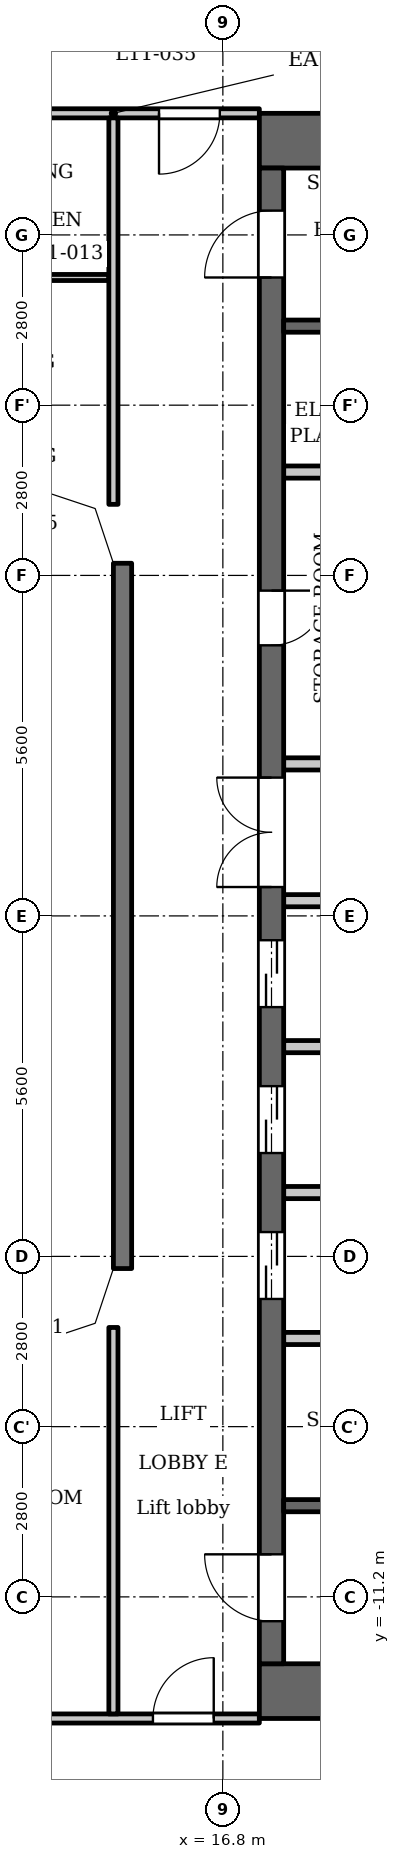
"""IFC4 building model, lengths in metres.
Left out: names, types, materials, properties, quantities, classifications, styles, units other than length and angle.
Written with IfcOpenShell. Run it as: python <this file> out.ifc"""

import sys

from ifc_helpers import new_model, si_unit, direction, frame, frame_2d, origin, place, context, subcontext, project, spatial, polyline, rectangle, outline, extrude, element, fill, save


model = new_model("IFC4")
c1 = context("Model", 3, precision=1e-05, world=origin(), true_north=direction((0.0, 1.0)))
c2 = subcontext(c1, "Body", "Model", "MODEL_VIEW")
j1 = project(units=[si_unit("LENGTHUNIT", "METRE"), si_unit("PLANEANGLEUNIT", "RADIAN")], contexts=[c1])
p1 = place(None, origin())
s1 = spatial("IfcSite", under=j1, at=p1, CompositionType="ELEMENT")
p2 = place(p1, origin())
s2 = spatial("IfcBuilding", under=s1, at=p2, CompositionType="ELEMENT")
p3 = place(p2, frame((0.0, 0.0, 48.0)))
s3 = spatial("IfcBuildingStorey", under=s2, at=p3, CompositionType="ELEMENT", Elevation=48.0)
p4 = place(p3, frame((15.15, 5.8, 0.0), z_axis=(0.0, 0.0, 1.0), x_axis=(0.0, -1.0, 0.0)))
e1 = element("IfcWall", 1, at=p4, inside=s3, PredefinedType="SOLIDWALL", context=c2, shape_type="SweptSolid", body=[
    extrude(rectangle(XDim=11.6, YDim=0.3, at=frame_2d((5.8, 0.0))), origin(), (0.0, 0.0, 1.0), 3.2),
])
for number, where, z_axis, x_axis in (
    (2, (17.4, 12.75, 0.0), (0.0, 0.0, 1.0), (1.0, 0.0, 0.0)),
    (3, (17.4, -12.75, 0.0), (0.0, 0.0, 1.0), (1.0, 0.0, 0.0)),
):
    element("IfcWall", number, at=place(p3, frame(where, z_axis=z_axis, x_axis=x_axis)), inside=s3, PredefinedType="SHEAR", context=c2, shape_type="SweptSolid", body=[
        extrude(rectangle(XDim=10.4, YDim=0.9, at=frame_2d((5.2, 0.0))), origin(), (0.0, 0.0, 1.0), 3.2),
    ])
p5 = place(p3, frame((17.6, -12.3, 0.0), z_axis=(0.0, 0.0, 1.0), x_axis=(0.0, 1.0, 0.0)))
e4 = element("IfcWall", 4, at=p5, inside=s3, PredefinedType="SHEAR", context=c2, shape_type="SweptSolid", body=[
    extrude(rectangle(XDim=24.6, YDim=0.4, at=frame_2d((12.3, 0.0))), origin(), (0.0, 0.0, 1.0), 3.2),
])
p6 = place(p5, frame((6.0, 0.0, 0.0)))
e5 = element("IfcOpeningElement", 5, at=p6, cuts=e4, PredefinedType="OPENING", context=c2, shape_type="SweptSolid", body=[
    extrude(rectangle(XDim=1.1, YDim=2.1, at=frame_2d((0.55, 1.05))), frame((0.0, 0.21, 0.0), z_axis=(0.0, -1.0, 0.0), x_axis=(1.0, 0.0, 0.0)), (0.0, 0.0, 1.0), 0.42),
])
p7 = place(p5, frame((8.4, 0.0, 0.0)))
e6 = element("IfcOpeningElement", 6, at=p7, cuts=e4, PredefinedType="OPENING", context=c2, shape_type="SweptSolid", body=[
    extrude(rectangle(XDim=1.1, YDim=2.1, at=frame_2d((0.55, 1.05))), frame((0.0, 0.21, 0.0), z_axis=(0.0, -1.0, 0.0), x_axis=(1.0, 0.0, 0.0)), (0.0, 0.0, 1.0), 0.42),
])
p8 = place(p5, frame((10.8, 0.0, 0.0)))
e7 = element("IfcOpeningElement", 7, at=p8, cuts=e4, PredefinedType="OPENING", context=c2, shape_type="SweptSolid", body=[
    extrude(rectangle(XDim=1.1, YDim=2.1, at=frame_2d((0.55, 1.05))), frame((0.0, 0.21, 0.0), z_axis=(0.0, -1.0, 0.0), x_axis=(1.0, 0.0, 0.0)), (0.0, 0.0, 1.0), 0.42),
])
p9 = place(p5, frame((16.75, 0.0, 0.0)))
e8 = element("IfcOpeningElement", 8, at=p9, cuts=e4, PredefinedType="OPENING", context=c2, shape_type="SweptSolid", body=[
    extrude(rectangle(XDim=0.9, YDim=2.1, at=frame_2d((0.45, 1.05))), frame((0.0, 0.21, 0.0), z_axis=(0.0, -1.0, 0.0), x_axis=(1.0, 0.0, 0.0)), (0.0, 0.0, 1.0), 0.42),
])
p10 = place(p5, frame((22.8, 0.0, 0.0)))
e9 = element("IfcOpeningElement", 9, at=p10, cuts=e4, PredefinedType="OPENING", context=c2, shape_type="SweptSolid", body=[
    extrude(rectangle(XDim=1.1, YDim=2.1, at=frame_2d((0.55, 1.05))), frame((0.0, 0.21, 0.0), z_axis=(0.0, -1.0, 0.0), x_axis=(1.0, 0.0, 0.0)), (0.0, 0.0, 1.0), 0.42),
])
p11 = place(p5, frame((0.7, 0.0, 0.0)))
e10 = element("IfcOpeningElement", 10, at=p11, cuts=e4, PredefinedType="OPENING", context=c2, shape_type="SweptSolid", body=[
    extrude(rectangle(XDim=1.1, YDim=2.1, at=frame_2d((0.55, 1.05))), frame((0.0, 0.21, 0.0), z_axis=(0.0, -1.0, 0.0), x_axis=(1.0, 0.0, 0.0)), (0.0, 0.0, 1.0), 0.42),
])
p12 = place(p5, frame((12.775, 0.0, 0.0)))
e11 = element("IfcOpeningElement", 11, at=p12, cuts=e4, PredefinedType="OPENING", context=c2, shape_type="SweptSolid", body=[
    extrude(rectangle(XDim=1.8, YDim=2.1, at=frame_2d((0.9, 1.05))), frame((0.0, 0.21, 0.0), z_axis=(0.0, -1.0, 0.0), x_axis=(1.0, 0.0, 0.0)), (0.0, 0.0, 1.0), 0.42),
])
p13 = place(p3, frame((17.8, -9.7, 0.0), z_axis=(0.0, 0.0, 1.0), x_axis=(1.0, 0.0, 0.0)))
e12 = element("IfcWall", 12, at=p13, inside=s3, PredefinedType="SHEAR", context=c2, shape_type="SweptSolid", body=[
    extrude(rectangle(XDim=8.3, YDim=0.2, at=frame_2d((4.15, 0.0))), origin(), (0.0, 0.0, 1.0), 3.2),
])
p14 = place(p13, frame((0.85, 0.0, 0.0)))
e13 = element("IfcOpeningElement", 13, at=p14, cuts=e12, PredefinedType="OPENING", context=c2, shape_type="SweptSolid", body=[
    extrude(rectangle(XDim=1.1, YDim=2.1, at=frame_2d((0.55, 1.05))), frame((0.0, 0.11, 0.0), z_axis=(0.0, -1.0, 0.0), x_axis=(1.0, 0.0, 0.0)), (0.0, 0.0, 1.0), 0.22),
])
p15 = place(p13, frame((3.75, 0.0, 0.0)))
e14 = element("IfcOpeningElement", 14, at=p15, cuts=e12, PredefinedType="OPENING", context=c2, shape_type="SweptSolid", body=[
    extrude(rectangle(XDim=1.1, YDim=2.1, at=frame_2d((0.55, 1.05))), frame((0.0, 0.11, 0.0), z_axis=(0.0, -1.0, 0.0), x_axis=(1.0, 0.0, 0.0)), (0.0, 0.0, 1.0), 0.22),
])
for number, where, z_axis, x_axis in (
    (15, (17.8, -6.95, 0.0), (0.0, 0.0, 1.0), (1.0, 0.0, 0.0)),
    (16, (17.8, -4.55, 0.0), (0.0, 0.0, 1.0), (1.0, 0.0, 0.0)),
    (17, (17.8, -2.15, 0.0), (0.0, 0.0, 1.0), (1.0, 0.0, 0.0)),
):
    element("IfcWall", number, at=place(p3, frame(where, z_axis=z_axis, x_axis=x_axis)), inside=s3, PredefinedType="PARTITIONING", context=c2, shape_type="SweptSolid", body=[
        extrude(rectangle(XDim=2.8, YDim=0.2, at=frame_2d((1.4, 0.0))), origin(), (0.0, 0.0, 1.0), 3.2),
    ])
p16 = place(p3, frame((17.8, 0.25, 0.0), z_axis=(0.0, 0.0, 1.0), x_axis=(1.0, 0.0, 0.0)))
e18 = element("IfcWall", 18, at=p16, inside=s3, PredefinedType="PARTITIONING", context=c2, shape_type="SweptSolid", body=[
    extrude(rectangle(XDim=3.0, YDim=0.2, at=frame_2d((1.5, 0.0))), origin(), (0.0, 0.0, 1.0), 3.2),
])
p17 = place(p3, frame((17.8, 2.5, 0.0), z_axis=(0.0, 0.0, 1.0), x_axis=(1.0, 0.0, 0.0)))
e19 = element("IfcWall", 19, at=p17, inside=s3, PredefinedType="PARTITIONING", context=c2, shape_type="SweptSolid", body=[
    extrude(rectangle(XDim=3.0, YDim=0.2, at=frame_2d((1.5, 0.0))), origin(), (0.0, 0.0, 1.0), 3.2),
])
p18 = place(p17, frame((1.7, 0.0, 0.0)))
e20 = element("IfcOpeningElement", 20, at=p18, cuts=e19, PredefinedType="OPENING", context=c2, shape_type="SweptSolid", body=[
    extrude(rectangle(XDim=0.9, YDim=2.1, at=frame_2d((0.45, 1.05))), frame((0.0, 0.11, 0.0), z_axis=(0.0, -1.0, 0.0), x_axis=(1.0, 0.0, 0.0)), (0.0, 0.0, 1.0), 0.22),
])
p19 = place(p3, frame((17.8, 7.3, 0.0), z_axis=(0.0, 0.0, 1.0), x_axis=(1.0, 0.0, 0.0)))
e21 = element("IfcWall", 21, at=p19, inside=s3, PredefinedType="PARTITIONING", context=c2, shape_type="SweptSolid", body=[
    extrude(rectangle(XDim=2.8, YDim=0.2, at=frame_2d((1.4, 0.0))), origin(), (0.0, 0.0, 1.0), 3.2),
])
p20 = place(p3, frame((17.8, 9.7, 0.0), z_axis=(0.0, 0.0, 1.0), x_axis=(1.0, 0.0, 0.0)))
e22 = element("IfcWall", 22, at=p20, inside=s3, PredefinedType="SHEAR", context=c2, shape_type="SweptSolid", body=[
    extrude(rectangle(XDim=8.3, YDim=0.2, at=frame_2d((4.15, 0.0))), origin(), (0.0, 0.0, 1.0), 3.2),
])
p21 = place(p20, frame((0.85, 0.0, 0.0)))
e23 = element("IfcOpeningElement", 23, at=p21, cuts=e22, PredefinedType="OPENING", context=c2, shape_type="SweptSolid", body=[
    extrude(rectangle(XDim=1.1, YDim=2.1, at=frame_2d((0.55, 1.05))), frame((0.0, 0.11, 0.0), z_axis=(0.0, -1.0, 0.0), x_axis=(1.0, 0.0, 0.0)), (0.0, 0.0, 1.0), 0.22),
])
p22 = place(p20, frame((3.75, 0.0, 0.0)))
e24 = element("IfcOpeningElement", 24, at=p22, cuts=e22, PredefinedType="OPENING", context=c2, shape_type="SweptSolid", body=[
    extrude(rectangle(XDim=1.1, YDim=2.1, at=frame_2d((0.55, 1.05))), frame((0.0, 0.11, 0.0), z_axis=(0.0, -1.0, 0.0), x_axis=(1.0, 0.0, 0.0)), (0.0, 0.0, 1.0), 0.22),
])
p23 = place(p3, frame((-17.4, -13.2, 0.0), z_axis=(0.0, 0.0, 1.0), x_axis=(1.0, 0.0, 0.0)))
e25 = element("IfcWall", 25, at=p23, inside=s3, PredefinedType="PARTITIONING", context=c2, shape_type="SweptSolid", body=[
    extrude(rectangle(XDim=34.8, YDim=0.15, at=frame_2d((17.4, 0.0))), origin(), (0.0, 0.0, 1.0), 3.2),
])
p24 = place(p23, frame((0.65, 0.0, 0.0)))
e26 = element("IfcOpeningElement", 26, at=p24, cuts=e25, PredefinedType="OPENING", context=c2, shape_type="SweptSolid", body=[
    extrude(rectangle(XDim=1.0, YDim=2.1, at=frame_2d((0.5, 1.05))), frame((0.0, 0.085, 0.0), z_axis=(0.0, -1.0, 0.0), x_axis=(1.0, 0.0, 0.0)), (0.0, 0.0, 1.0), 0.17),
])
p25 = place(p23, frame((33.05, 0.0, 0.0)))
e27 = element("IfcOpeningElement", 27, at=p25, cuts=e25, PredefinedType="OPENING", context=c2, shape_type="SweptSolid", body=[
    extrude(rectangle(XDim=1.0, YDim=2.1, at=frame_2d((0.5, 1.05))), frame((0.0, 0.085, 0.0), z_axis=(0.0, -1.0, 0.0), x_axis=(1.0, 0.0, 0.0)), (0.0, 0.0, 1.0), 0.17),
])
p26 = place(p23, frame((4.55, 0.0, 0.0)))
e28 = element("IfcOpeningElement", 28, at=p26, cuts=e25, PredefinedType="OPENING", context=c2, shape_type="SweptSolid", body=[
    extrude(rectangle(XDim=1.0, YDim=2.1, at=frame_2d((0.5, 1.05))), frame((0.0, 0.085, 0.0), z_axis=(0.0, -1.0, 0.0), x_axis=(1.0, 0.0, 0.0)), (0.0, 0.0, 1.0), 0.17),
])
p27 = place(p23, frame((6.9, 0.0, 0.0)))
e29 = element("IfcOpeningElement", 29, at=p27, cuts=e25, PredefinedType="OPENING", context=c2, shape_type="SweptSolid", body=[
    extrude(rectangle(XDim=1.0, YDim=2.1, at=frame_2d((0.5, 1.05))), frame((0.0, 0.085, 0.0), z_axis=(0.0, -1.0, 0.0), x_axis=(1.0, 0.0, 0.0)), (0.0, 0.0, 1.0), 0.17),
])
p28 = place(p23, frame((15.75, 0.0, 0.0)))
e30 = element("IfcOpeningElement", 30, at=p28, cuts=e25, PredefinedType="OPENING", context=c2, shape_type="SweptSolid", body=[
    extrude(rectangle(XDim=1.0, YDim=2.1, at=frame_2d((0.5, 1.05))), frame((0.0, 0.085, 0.0), z_axis=(0.0, -1.0, 0.0), x_axis=(1.0, 0.0, 0.0)), (0.0, 0.0, 1.0), 0.17),
])
p29 = place(p23, frame((18.1, 0.0, 0.0)))
e31 = element("IfcOpeningElement", 31, at=p29, cuts=e25, PredefinedType="OPENING", context=c2, shape_type="SweptSolid", body=[
    extrude(rectangle(XDim=1.0, YDim=2.1, at=frame_2d((0.5, 1.05))), frame((0.0, 0.085, 0.0), z_axis=(0.0, -1.0, 0.0), x_axis=(1.0, 0.0, 0.0)), (0.0, 0.0, 1.0), 0.17),
])
p30 = place(p23, frame((26.95, 0.0, 0.0)))
e32 = element("IfcOpeningElement", 32, at=p30, cuts=e25, PredefinedType="OPENING", context=c2, shape_type="SweptSolid", body=[
    extrude(rectangle(XDim=1.0, YDim=2.1, at=frame_2d((0.5, 1.05))), frame((0.0, 0.085, 0.0), z_axis=(0.0, -1.0, 0.0), x_axis=(1.0, 0.0, 0.0)), (0.0, 0.0, 1.0), 0.17),
])
p31 = place(p23, frame((29.25, 0.0, 0.0)))
e33 = element("IfcOpeningElement", 33, at=p31, cuts=e25, PredefinedType="OPENING", context=c2, shape_type="SweptSolid", body=[
    extrude(rectangle(XDim=1.0, YDim=2.1, at=frame_2d((0.5, 1.05))), frame((0.0, 0.085, 0.0), z_axis=(0.0, -1.0, 0.0), x_axis=(1.0, 0.0, 0.0)), (0.0, 0.0, 1.0), 0.17),
])
p32 = place(p3, frame((-14.925, 10.5, 0.0), z_axis=(0.0, 0.0, 1.0), x_axis=(1.0, 0.0, 0.0)))
e34 = element("IfcWall", 34, at=p32, inside=s3, PredefinedType="PARTITIONING", context=c2, shape_type="SweptSolid", body=[
    extrude(rectangle(XDim=29.85, YDim=0.1, at=frame_2d((14.925, 0.0))), origin(), (0.0, 0.0, 1.0), 3.2),
])
p33 = place(p32, frame((4.375, 0.0, 0.0)))
e35 = element("IfcOpeningElement", 35, at=p33, cuts=e34, PredefinedType="OPENING", context=c2, shape_type="SweptSolid", body=[
    extrude(rectangle(XDim=0.8, YDim=2.1, at=frame_2d((0.4, 1.05))), frame((0.0, 0.06, 0.0), z_axis=(0.0, -1.0, 0.0), x_axis=(1.0, 0.0, 0.0)), (0.0, 0.0, 1.0), 0.12),
])
p34 = place(p32, frame((0.575, 0.0, 0.0)))
e36 = element("IfcOpeningElement", 36, at=p34, cuts=e34, PredefinedType="OPENING", context=c2, shape_type="SweptSolid", body=[
    extrude(rectangle(XDim=0.9, YDim=2.1, at=frame_2d((0.45, 1.05))), frame((0.0, 0.06, 0.0), z_axis=(0.0, -1.0, 0.0), x_axis=(1.0, 0.0, 0.0)), (0.0, 0.0, 1.0), 0.12),
])
p35 = place(p32, frame((13.475, 0.0, 0.0)))
e37 = element("IfcOpeningElement", 37, at=p35, cuts=e34, PredefinedType="OPENING", context=c2, shape_type="SweptSolid", body=[
    extrude(rectangle(XDim=0.8, YDim=2.1, at=frame_2d((0.4, 1.05))), frame((0.0, 0.06, 0.0), z_axis=(0.0, -1.0, 0.0), x_axis=(1.0, 0.0, 0.0)), (0.0, 0.0, 1.0), 0.12),
])
p36 = place(p32, frame((9.975, 0.0, 0.0)))
e38 = element("IfcOpeningElement", 38, at=p36, cuts=e34, PredefinedType="OPENING", context=c2, shape_type="SweptSolid", body=[
    extrude(rectangle(XDim=0.9, YDim=2.1, at=frame_2d((0.45, 1.05))), frame((0.0, 0.06, 0.0), z_axis=(0.0, -1.0, 0.0), x_axis=(1.0, 0.0, 0.0)), (0.0, 0.0, 1.0), 0.12),
])
p37 = place(p32, frame((19.075, 0.0, 0.0)))
e39 = element("IfcOpeningElement", 39, at=p37, cuts=e34, PredefinedType="OPENING", context=c2, shape_type="SweptSolid", body=[
    extrude(rectangle(XDim=0.8, YDim=2.1, at=frame_2d((0.4, 1.05))), frame((0.0, 0.06, 0.0), z_axis=(0.0, -1.0, 0.0), x_axis=(1.0, 0.0, 0.0)), (0.0, 0.0, 1.0), 0.12),
])
p38 = place(p32, frame((16.075, 0.0, 0.0)))
e40 = element("IfcOpeningElement", 40, at=p38, cuts=e34, PredefinedType="OPENING", context=c2, shape_type="SweptSolid", body=[
    extrude(rectangle(XDim=0.9, YDim=2.1, at=frame_2d((0.45, 1.05))), frame((0.0, 0.06, 0.0), z_axis=(0.0, -1.0, 0.0), x_axis=(1.0, 0.0, 0.0)), (0.0, 0.0, 1.0), 0.12),
])
p39 = place(p32, frame((21.175, 0.0, 0.0)))
e41 = element("IfcOpeningElement", 41, at=p39, cuts=e34, PredefinedType="OPENING", context=c2, shape_type="SweptSolid", body=[
    extrude(rectangle(XDim=0.8, YDim=2.1, at=frame_2d((0.4, 1.05))), frame((0.0, 0.06, 0.0), z_axis=(0.0, -1.0, 0.0), x_axis=(1.0, 0.0, 0.0)), (0.0, 0.0, 1.0), 0.12),
])
p40 = place(p32, frame((26.775, 0.0, 0.0)))
e42 = element("IfcOpeningElement", 42, at=p40, cuts=e34, PredefinedType="OPENING", context=c2, shape_type="SweptSolid", body=[
    extrude(rectangle(XDim=0.9, YDim=2.1, at=frame_2d((0.45, 1.05))), frame((0.0, 0.06, 0.0), z_axis=(0.0, -1.0, 0.0), x_axis=(1.0, 0.0, 0.0)), (0.0, 0.0, 1.0), 0.12),
])
p41 = place(p3, frame((-17.4, 13.2, 0.0), z_axis=(0.0, 0.0, 1.0), x_axis=(1.0, 0.0, 0.0)))
e43 = element("IfcWall", 43, at=p41, inside=s3, PredefinedType="PARTITIONING", context=c2, shape_type="SweptSolid", body=[
    extrude(rectangle(XDim=34.8, YDim=0.15, at=frame_2d((17.4, 0.0))), origin(), (0.0, 0.0, 1.0), 3.2),
])
p42 = place(p41, frame((0.75, 0.0, 0.0)))
e44 = element("IfcOpeningElement", 44, at=p42, cuts=e43, PredefinedType="OPENING", context=c2, shape_type="SweptSolid", body=[
    extrude(rectangle(XDim=1.0, YDim=2.1, at=frame_2d((0.5, 1.05))), frame((0.0, 0.085, 0.0), z_axis=(0.0, -1.0, 0.0), x_axis=(1.0, 0.0, 0.0)), (0.0, 0.0, 1.0), 0.17),
])
p43 = place(p41, frame((33.15, 0.0, 0.0)))
e45 = element("IfcOpeningElement", 45, at=p43, cuts=e43, PredefinedType="OPENING", context=c2, shape_type="SweptSolid", body=[
    extrude(rectangle(XDim=1.0, YDim=2.1, at=frame_2d((0.5, 1.05))), frame((0.0, 0.085, 0.0), z_axis=(0.0, -1.0, 0.0), x_axis=(1.0, 0.0, 0.0)), (0.0, 0.0, 1.0), 0.17),
])
p44 = place(p41, frame((3.05, 0.0, 0.0)))
e46 = element("IfcOpeningElement", 46, at=p44, cuts=e43, PredefinedType="OPENING", context=c2, shape_type="SweptSolid", body=[
    extrude(rectangle(XDim=1.0, YDim=2.1, at=frame_2d((0.5, 1.05))), frame((0.0, 0.085, 0.0), z_axis=(0.0, -1.0, 0.0), x_axis=(1.0, 0.0, 0.0)), (0.0, 0.0, 1.0), 0.17),
])
p45 = place(p41, frame((12.45, 0.0, 0.0)))
e47 = element("IfcOpeningElement", 47, at=p45, cuts=e43, PredefinedType="OPENING", context=c2, shape_type="SweptSolid", body=[
    extrude(rectangle(XDim=1.0, YDim=2.1, at=frame_2d((0.5, 1.05))), frame((0.0, 0.085, 0.0), z_axis=(0.0, -1.0, 0.0), x_axis=(1.0, 0.0, 0.0)), (0.0, 0.0, 1.0), 0.17),
])
p46 = place(p41, frame((18.3, 0.0, 0.0)))
e48 = element("IfcOpeningElement", 48, at=p46, cuts=e43, PredefinedType="OPENING", context=c2, shape_type="SweptSolid", body=[
    extrude(rectangle(XDim=1.0, YDim=2.1, at=frame_2d((0.5, 1.05))), frame((0.0, 0.085, 0.0), z_axis=(0.0, -1.0, 0.0), x_axis=(1.0, 0.0, 0.0)), (0.0, 0.0, 1.0), 0.17),
])
p47 = place(p41, frame((29.25, 0.0, 0.0)))
e49 = element("IfcOpeningElement", 49, at=p47, cuts=e43, PredefinedType="OPENING", context=c2, shape_type="SweptSolid", body=[
    extrude(rectangle(XDim=1.0, YDim=2.1, at=frame_2d((0.5, 1.05))), frame((0.0, 0.085, 0.0), z_axis=(0.0, -1.0, 0.0), x_axis=(1.0, 0.0, 0.0)), (0.0, 0.0, 1.0), 0.17),
])
for number, where, z_axis, x_axis in (
    (50, (15.0, -13.125, 0.0), (0.0, 0.0, 1.0), (0.0, 1.0, 0.0)),
    (51, (15.0, 6.769, 0.0), (0.0, 0.0, 1.0), (0.0, 1.0, 0.0)),
):
    element("IfcWall", number, at=place(p3, frame(where, z_axis=z_axis, x_axis=x_axis)), inside=s3, PredefinedType="PARTITIONING", context=c2, shape_type="SweptSolid", body=[
        extrude(rectangle(XDim=6.356, YDim=0.15, at=frame_2d((3.178, 0.0))), origin(), (0.0, 0.0, 1.0), 3.2),
    ])
p48 = place(p3, origin())
e52 = element("IfcWall", 52, at=p48, inside=s3, PredefinedType="SOLIDWALL", context=c2, shape_type="SweptSolid", body=[
    extrude(outline(polyline([(14.937, 6.937), (13.849, 7.3), (13.8, 7.3), (13.8, 7.0), (14.7, 6.7), (15.0, 5.8), (15.3, 5.8), (15.3, 5.849), (14.937, 6.937)])), origin(), (0.0, 0.0, 1.0), 3.2),
])
e53 = element("IfcWall", 53, at=p48, inside=s3, PredefinedType="SOLIDWALL", context=c2, shape_type="SweptSolid", body=[
    extrude(outline(polyline([(14.937, -6.937), (15.3, -5.849), (15.3, -5.8), (15.0, -5.8), (14.7, -6.7), (13.8, -7.0), (13.8, -7.3), (13.849, -7.3), (14.937, -6.937)])), origin(), (0.0, 0.0, 1.0), 3.2),
])
p49 = place(p6, origin())
e54 = element("IfcDoor", 54, at=p49, inside=s3, OperationType="DOUBLE_DOOR_SLIDING", PredefinedType="DOOR", context=c2, shape_type="SweptSolid", body=[
    extrude(rectangle(XDim=1.1, YDim=2.1, at=frame_2d((0.55, 1.05))), frame((0.0, 0.025, 0.0), z_axis=(0.0, -1.0, 0.0), x_axis=(1.0, 0.0, 0.0)), (0.0, 0.0, 1.0), 0.05),
])
fill(e5, e54)
p50 = place(p7, origin())
e55 = element("IfcDoor", 55, at=p50, inside=s3, OperationType="DOUBLE_DOOR_SLIDING", PredefinedType="DOOR", context=c2, shape_type="SweptSolid", body=[
    extrude(rectangle(XDim=1.1, YDim=2.1, at=frame_2d((0.55, 1.05))), frame((0.0, 0.025, 0.0), z_axis=(0.0, -1.0, 0.0), x_axis=(1.0, 0.0, 0.0)), (0.0, 0.0, 1.0), 0.05),
])
fill(e6, e55)
p51 = place(p8, origin())
e56 = element("IfcDoor", 56, at=p51, inside=s3, OperationType="DOUBLE_DOOR_SLIDING", PredefinedType="DOOR", context=c2, shape_type="SweptSolid", body=[
    extrude(rectangle(XDim=1.1, YDim=2.1, at=frame_2d((0.55, 1.05))), frame((0.0, 0.025, 0.0), z_axis=(0.0, -1.0, 0.0), x_axis=(1.0, 0.0, 0.0)), (0.0, 0.0, 1.0), 0.05),
])
fill(e7, e56)
p52 = place(p9, origin())
e57 = element("IfcDoor", 57, at=p52, inside=s3, OperationType="SINGLE_SWING_RIGHT", PredefinedType="DOOR", context=c2, shape_type="SweptSolid", body=[
    extrude(rectangle(XDim=0.9, YDim=2.1, at=frame_2d((0.45, 1.05))), frame((0.0, 0.025, 0.0), z_axis=(0.0, -1.0, 0.0), x_axis=(1.0, 0.0, 0.0)), (0.0, 0.0, 1.0), 0.05),
])
fill(e8, e57)
p53 = place(p10, origin())
e58 = element("IfcDoor", 58, at=p53, inside=s3, OperationType="SINGLE_SWING_RIGHT", PredefinedType="DOOR", context=c2, shape_type="SweptSolid", body=[
    extrude(rectangle(XDim=1.1, YDim=2.1, at=frame_2d((0.55, 1.05))), frame((0.0, 0.025, 0.0), z_axis=(0.0, -1.0, 0.0), x_axis=(1.0, 0.0, 0.0)), (0.0, 0.0, 1.0), 0.05),
])
fill(e9, e58)
p54 = place(p11, origin())
e59 = element("IfcDoor", 59, at=p54, inside=s3, OperationType="SINGLE_SWING_LEFT", PredefinedType="DOOR", context=c2, shape_type="SweptSolid", body=[
    extrude(rectangle(XDim=1.1, YDim=2.1, at=frame_2d((0.55, 1.05))), frame((0.0, 0.025, 0.0), z_axis=(0.0, -1.0, 0.0), x_axis=(1.0, 0.0, 0.0)), (0.0, 0.0, 1.0), 0.05),
])
fill(e10, e59)
p55 = place(p12, origin())
e60 = element("IfcDoor", 60, at=p55, inside=s3, OperationType="DOUBLE_DOOR_SINGLE_SWING", PredefinedType="DOOR", context=c2, shape_type="SweptSolid", body=[
    extrude(rectangle(XDim=1.8, YDim=2.1, at=frame_2d((0.9, 1.05))), frame((0.0, 0.025, 0.0), z_axis=(0.0, -1.0, 0.0), x_axis=(1.0, 0.0, 0.0)), (0.0, 0.0, 1.0), 0.05),
])
fill(e11, e60)
p56 = place(p43, origin())
e61 = element("IfcDoor", 61, at=p56, inside=s3, OperationType="SINGLE_SWING_LEFT", PredefinedType="DOOR", context=c2, shape_type="SweptSolid", body=[
    extrude(rectangle(XDim=1.0, YDim=2.1, at=frame_2d((0.5, 1.05))), frame((0.0, 0.025, 0.0), z_axis=(0.0, -1.0, 0.0), x_axis=(1.0, 0.0, 0.0)), (0.0, 0.0, 1.0), 0.05),
])
fill(e45, e61)
p57 = place(p25, origin())
e62 = element("IfcDoor", 62, at=p57, inside=s3, OperationType="SINGLE_SWING_LEFT", PredefinedType="DOOR", context=c2, shape_type="SweptSolid", body=[
    extrude(rectangle(XDim=1.0, YDim=2.1, at=frame_2d((0.5, 1.05))), frame((0.0, 0.025, 0.0), z_axis=(0.0, -1.0, 0.0), x_axis=(1.0, 0.0, 0.0)), (0.0, 0.0, 1.0), 0.05),
])
fill(e27, e62)
save(model, sys.argv[1])
